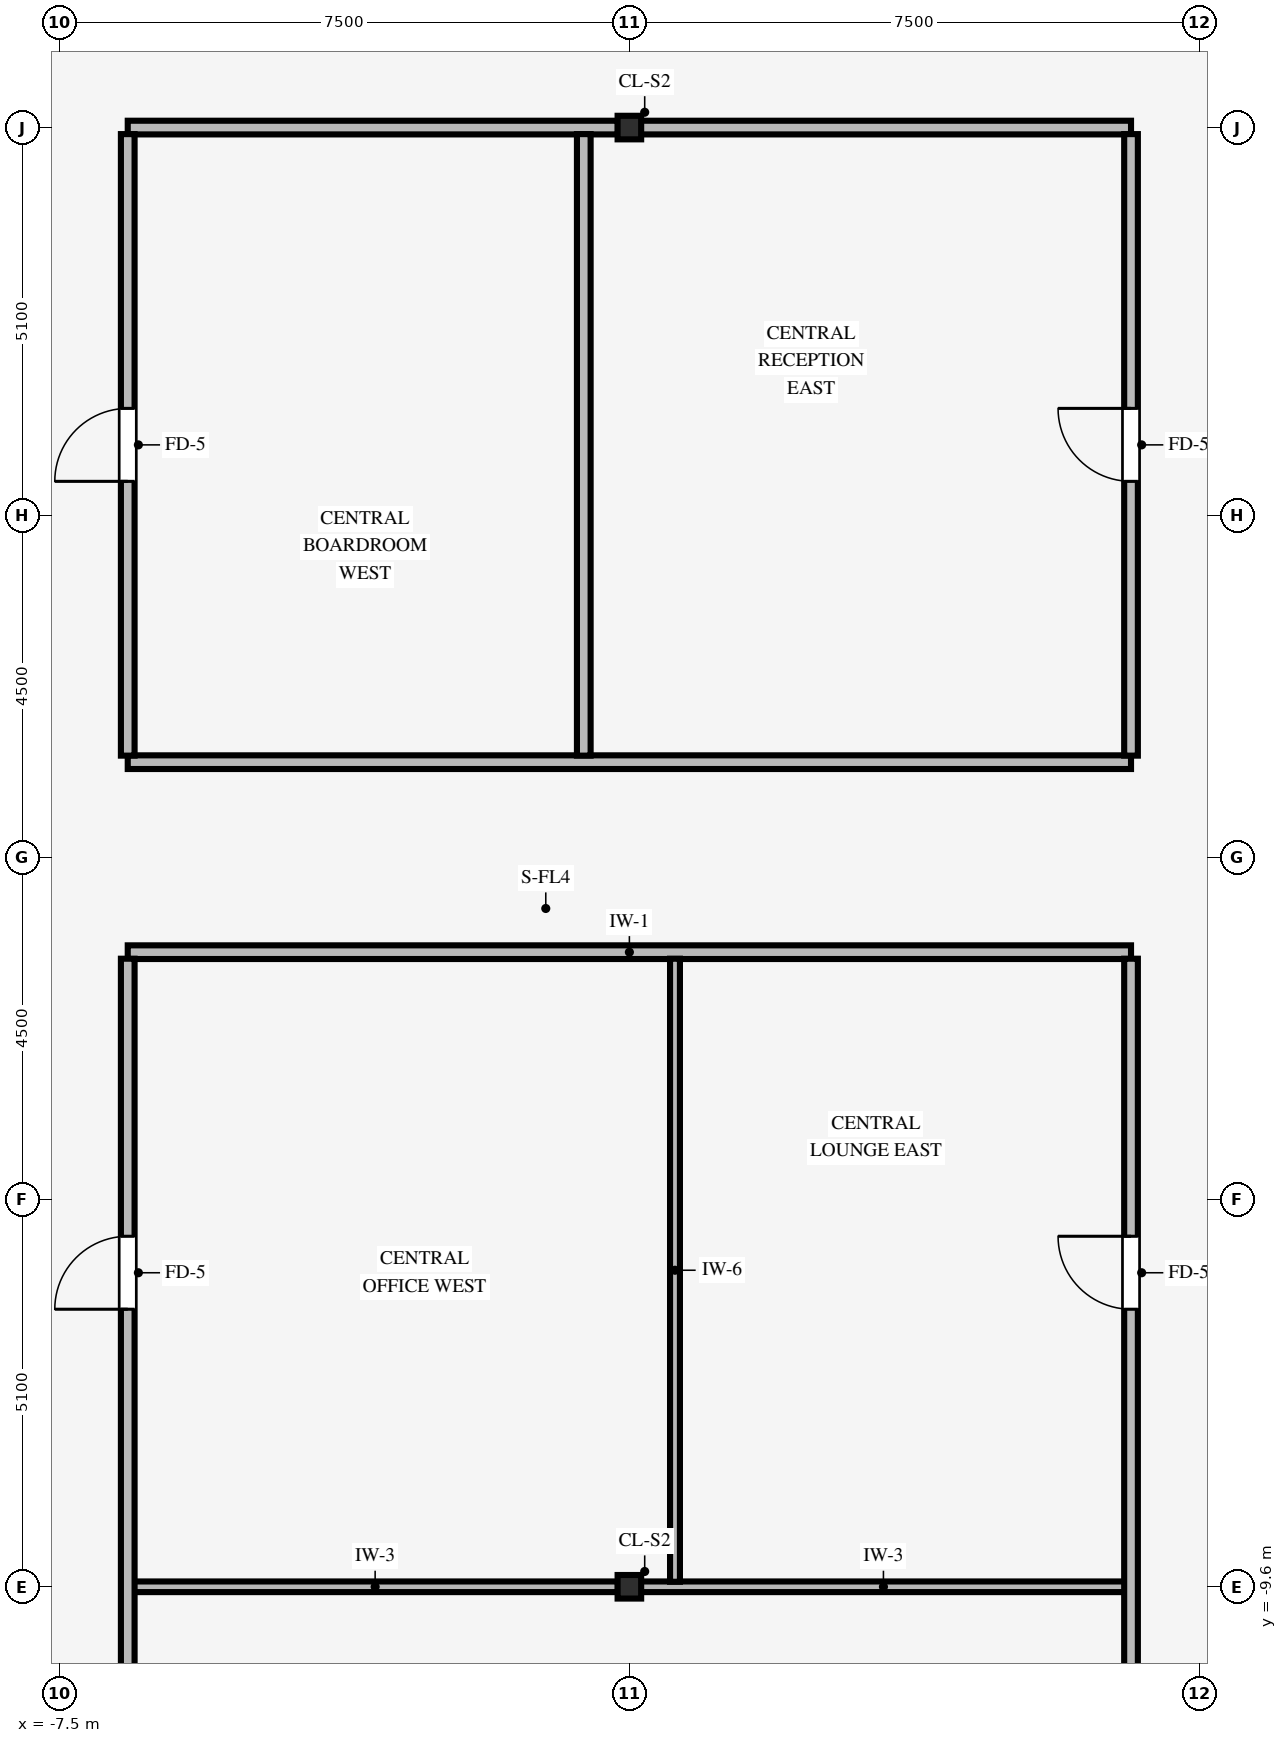
"""IFC4 building model, lengths in metres.
Left out: names, types, materials, properties, quantities, classifications, styles, units other than length and angle.
Written with IfcOpenShell. Run it as: python <this file> out.ifc"""

import sys

from ifc_helpers import new_model, si_unit, direction, frame, frame_2d, origin, origin_2d, place, context, subcontext, project, spatial, rectangle, i_section, extrude, source, transform, mapped, element, fill, save


model = new_model("IFC4")
c1 = context("Model", 3, precision=1e-05, world=origin(), true_north=direction((0.0, 1.0)))
c2 = subcontext(c1, "Body", "Model", "MODEL_VIEW")
j1 = project(units=[si_unit("LENGTHUNIT", "METRE"), si_unit("PLANEANGLEUNIT", "RADIAN")], contexts=[c1])
p1 = place(None, origin())
s1 = spatial("IfcSite", under=j1, at=p1, CompositionType="ELEMENT")
p2 = place(p1, origin())
s2 = spatial("IfcBuilding", under=s1, at=p2, CompositionType="ELEMENT")
p3 = place(p2, frame((0.0, 0.0, 249.3)))
s3 = spatial("IfcBuildingStorey", under=s2, at=p3, CompositionType="ELEMENT", Elevation=249.3)
for number, where, z_axis, x_axis in (
    (1, (0.0, -9.6, 0.0), (0.0, 0.0, 1.0), (1.0, 0.0, 0.0)),
    (2, (0.0, 9.6, 0.0), (0.0, 0.0, 1.0), (1.0, 0.0, 0.0)),
):
    element("IfcColumn", number, at=place(p3, frame(where, z_axis=z_axis, x_axis=x_axis)), inside=s3, PredefinedType="COLUMN", context=c2, shape_type="SweptSolid", body=[
        extrude(i_section(OverallWidth=0.31, OverallDepth=0.31, WebThickness=0.015, FlangeThickness=0.015, FilletRadius=0.015, at=origin_2d()), origin(), (0.0, 0.0, 1.0), 3.25),
    ])
p4 = place(p3, frame((-6.539, -9.6, 0.0), z_axis=(0.0, 0.0, 1.0), x_axis=(1.0, 0.0, 0.0)))
e3 = element("IfcWall", 3, at=p4, inside=s3, PredefinedType="PARTITIONING", context=c2, shape_type="SweptSolid", body=[
    extrude(rectangle(XDim=6.388, YDim=0.14, at=frame_2d((3.194, 0.0))), origin(), (0.0, 0.0, 1.0), 2.285),
])
p5 = place(p3, frame((0.151, -9.6, 0.0), z_axis=(0.0, 0.0, 1.0), x_axis=(1.0, 0.0, 0.0)))
e4 = element("IfcWall", 4, at=p5, inside=s3, PredefinedType="PARTITIONING", context=c2, shape_type="SweptSolid", body=[
    extrude(rectangle(XDim=6.383, YDim=0.14, at=frame_2d((3.191, 0.0))), origin(), (0.0, 0.0, 1.0), 2.285),
])
for number, where, z_axis, x_axis in (
    (5, (-6.6, -1.25, 0.0), (0.0, 0.0, 1.0), (1.0, 0.0, 0.0)),
    (6, (-6.6, 1.25, 0.0), (0.0, 0.0, 1.0), (1.0, 0.0, 0.0)),
):
    element("IfcWall", number, at=place(p3, frame(where, z_axis=z_axis, x_axis=x_axis)), inside=s3, PredefinedType="PARTITIONING", context=c2, shape_type="SweptSolid", body=[
        extrude(rectangle(XDim=13.2, YDim=0.18, at=frame_2d((6.6, 0.0))), origin(), (0.0, 0.0, 1.0), 3.24),
    ])
for number, where, z_axis, x_axis in (
    (7, (-6.6, 9.6, 0.0), (0.0, 0.0, 1.0), (1.0, 0.0, 0.0)),
    (8, (0.151, 9.6, 0.0), (0.0, 0.0, 1.0), (1.0, 0.0, 0.0)),
):
    element("IfcWall", number, at=place(p3, frame(where, z_axis=z_axis, x_axis=x_axis)), inside=s3, PredefinedType="PARTITIONING", context=c2, shape_type="SweptSolid", body=[
        extrude(rectangle(XDim=6.449, YDim=0.18, at=frame_2d((3.225, 0.0))), origin(), (0.0, 0.0, 1.0), 2.285),
    ])
p6 = place(p3, frame((-6.6, -19.1, 0.0), z_axis=(0.0, 0.0, 1.0), x_axis=(0.0, 1.0, 0.0)))
e9 = element("IfcWall", 9, at=p6, inside=s3, PredefinedType="PARTITIONING", context=c2, shape_type="SweptSolid", body=[
    extrude(rectangle(XDim=17.764, YDim=0.18, at=frame_2d((8.882, 0.0))), origin(), (0.0, 0.0, 1.0), 3.24),
])
p7 = place(p6, frame((13.152, 0.0, 0.0)))
e10 = element("IfcOpeningElement", 10, at=p7, cuts=e9, PredefinedType="OPENING", context=c2, shape_type="SweptSolid", body=[
    extrude(rectangle(XDim=0.96, YDim=2.1, at=frame_2d((0.48, 1.05))), frame((0.0, 0.1, 0.0), z_axis=(0.0, -1.0, 0.0), x_axis=(1.0, 0.0, 0.0)), (0.0, 0.0, 1.0), 0.2),
])
p8 = place(p6, frame((1.37, 0.0, 0.0)))
e11 = element("IfcOpeningElement", 11, at=p8, cuts=e9, PredefinedType="OPENING", context=c2, shape_type="SweptSolid", body=[
    extrude(rectangle(XDim=0.96, YDim=2.1, at=frame_2d((0.48, 1.05))), frame((0.0, 0.1, 0.0), z_axis=(0.0, -1.0, 0.0), x_axis=(1.0, 0.0, 0.0)), (0.0, 0.0, 1.0), 0.2),
])
p9 = place(p3, frame((-6.6, 1.336, 0.0), z_axis=(0.0, 0.0, 1.0), x_axis=(0.0, 1.0, 0.0)))
e12 = element("IfcWall", 12, at=p9, inside=s3, PredefinedType="PARTITIONING", context=c2, shape_type="SweptSolid", body=[
    extrude(rectangle(XDim=8.178, YDim=0.18, at=frame_2d((4.089, 0.0))), origin(), (0.0, 0.0, 1.0), 3.24),
])
p10 = place(p9, frame((3.609, 0.0, 0.0)))
e13 = element("IfcOpeningElement", 13, at=p10, cuts=e12, PredefinedType="OPENING", context=c2, shape_type="SweptSolid", body=[
    extrude(rectangle(XDim=0.96, YDim=2.1, at=frame_2d((0.48, 1.05))), frame((0.0, 0.1, 0.0), z_axis=(0.0, -1.0, 0.0), x_axis=(1.0, 0.0, 0.0)), (0.0, 0.0, 1.0), 0.2),
])
p11 = place(p3, frame((-0.6, 1.336, 0.0), z_axis=(0.0, 0.0, 1.0), x_axis=(0.0, 1.0, 0.0)))
e14 = element("IfcWall", 14, at=p11, inside=s3, PredefinedType="PARTITIONING", context=c2, shape_type="SweptSolid", body=[
    extrude(rectangle(XDim=8.178, YDim=0.18, at=frame_2d((4.089, 0.0))), origin(), (0.0, 0.0, 1.0), 3.24),
])
p12 = place(p3, frame((0.6, -9.534, 0.0), z_axis=(0.0, 0.0, 1.0), x_axis=(0.0, 1.0, 0.0)))
e15 = element("IfcWall", 15, at=p12, inside=s3, PredefinedType="PARTITIONING", context=c2, shape_type="SweptSolid", body=[
    extrude(rectangle(XDim=8.198, YDim=0.13, at=frame_2d((4.099, 0.0))), origin(), (0.0, 0.0, 1.0), 3.24),
])
p13 = place(p3, frame((6.6, -19.1, 0.0), z_axis=(0.0, 0.0, 1.0), x_axis=(0.0, 1.0, 0.0)))
e16 = element("IfcWall", 16, at=p13, inside=s3, PredefinedType="PARTITIONING", context=c2, shape_type="SweptSolid", body=[
    extrude(rectangle(XDim=17.764, YDim=0.18, at=frame_2d((8.882, 0.0))), origin(), (0.0, 0.0, 1.0), 3.24),
])
p14 = place(p13, frame((13.152, 0.0, 0.0)))
e17 = element("IfcOpeningElement", 17, at=p14, cuts=e16, PredefinedType="OPENING", context=c2, shape_type="SweptSolid", body=[
    extrude(rectangle(XDim=0.96, YDim=2.1, at=frame_2d((0.48, 1.05))), frame((0.0, 0.1, 0.0), z_axis=(0.0, -1.0, 0.0), x_axis=(1.0, 0.0, 0.0)), (0.0, 0.0, 1.0), 0.2),
])
p15 = place(p13, frame((6.62, 0.0, 0.0)))
e18 = element("IfcOpeningElement", 18, at=p15, cuts=e16, PredefinedType="OPENING", context=c2, shape_type="SweptSolid", body=[
    extrude(rectangle(XDim=0.96, YDim=2.1, at=frame_2d((0.48, 1.05))), frame((0.0, 0.1, 0.0), z_axis=(0.0, -1.0, 0.0), x_axis=(1.0, 0.0, 0.0)), (0.0, 0.0, 1.0), 0.2),
])
p16 = place(p3, frame((6.6, 1.336, 0.0), z_axis=(0.0, 0.0, 1.0), x_axis=(0.0, 1.0, 0.0)))
e19 = element("IfcWall", 19, at=p16, inside=s3, PredefinedType="PARTITIONING", context=c2, shape_type="SweptSolid", body=[
    extrude(rectangle(XDim=8.178, YDim=0.18, at=frame_2d((4.089, 0.0))), origin(), (0.0, 0.0, 1.0), 3.24),
])
p17 = place(p16, frame((3.609, 0.0, 0.0)))
e20 = element("IfcOpeningElement", 20, at=p17, cuts=e19, PredefinedType="OPENING", context=c2, shape_type="SweptSolid", body=[
    extrude(rectangle(XDim=0.96, YDim=2.1, at=frame_2d((0.48, 1.05))), frame((0.0, 0.1, 0.0), z_axis=(0.0, -1.0, 0.0), x_axis=(1.0, 0.0, 0.0)), (0.0, 0.0, 1.0), 0.2),
])
m1 = source(origin(), c2, "Body", "SweptSolid", [
    extrude(rectangle(XDim=0.96, YDim=2.1, at=frame_2d((0.48, 1.05))), frame((0.0, 0.025, 0.0), z_axis=(0.0, -1.0, 0.0), x_axis=(1.0, 0.0, 0.0)), (0.0, 0.0, 1.0), 0.05),
])
p18 = place(p7, origin())
e21 = element("IfcDoor", 21, at=p18, inside=s3, OperationType="SINGLE_SWING_LEFT", PredefinedType="DOOR", context=c2, shape_type="MappedRepresentation", body=[
    mapped(m1, transform((0.0, 0.0, 0.0), scale=1.0)),
])
fill(e10, e21)
p19 = place(p14, origin())
e22 = element("IfcDoor", 22, at=p19, inside=s3, OperationType="SINGLE_SWING_RIGHT", PredefinedType="DOOR", context=c2, shape_type="MappedRepresentation", body=[
    mapped(m1, transform((0.0, 0.0, 0.0), scale=1.0)),
])
fill(e17, e22)
p20 = place(p10, origin())
e23 = element("IfcDoor", 23, at=p20, inside=s3, OperationType="SINGLE_SWING_LEFT", PredefinedType="DOOR", context=c2, shape_type="MappedRepresentation", body=[
    mapped(m1, transform((0.0, 0.0, 0.0), scale=1.0)),
])
fill(e13, e23)
p21 = place(p17, origin())
e24 = element("IfcDoor", 24, at=p21, inside=s3, OperationType="SINGLE_SWING_RIGHT", PredefinedType="DOOR", context=c2, shape_type="MappedRepresentation", body=[
    mapped(m1, transform((0.0, 0.0, 0.0), scale=1.0)),
])
fill(e20, e24)
save(model, sys.argv[1])
